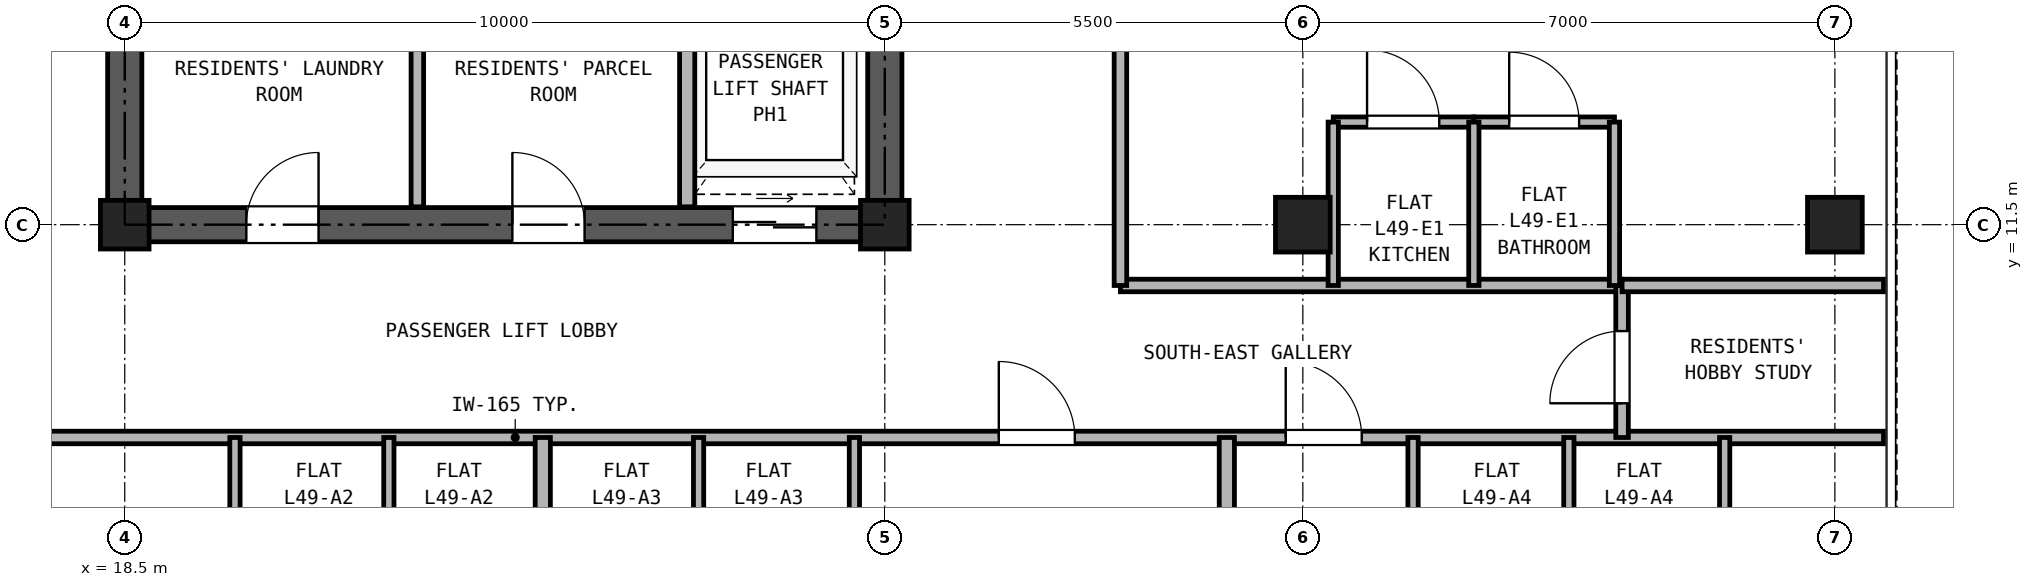
"""IFC4 building model, lengths in metres.
Left out: names, types, materials, properties, quantities, classifications, styles, units other than length and angle.
Written with IfcOpenShell. Run it as: python <this file> out.ifc"""

import sys

from ifc_helpers import new_model, si_unit, direction, frame, frame_2d, origin, origin_2d, place, context, subcontext, project, spatial, rectangle, hollow_rectangle, extrude, source, transform, mapped, element, fill, save


model = new_model("IFC4")
c1 = context("Model", 3, precision=1e-05, world=origin(), true_north=direction((0.0, 1.0)))
c2 = subcontext(c1, "Body", "Model", "MODEL_VIEW")
j1 = project(units=[si_unit("LENGTHUNIT", "METRE"), si_unit("PLANEANGLEUNIT", "RADIAN")], contexts=[c1])
p1 = place(None, origin())
s1 = spatial("IfcSite", under=j1, at=p1, CompositionType="ELEMENT")
p2 = place(p1, origin())
s2 = spatial("IfcBuilding", under=s1, at=p2, CompositionType="ELEMENT")
p3 = place(p2, frame((0.0, 0.0, 175.3)))
s3 = spatial("IfcBuildingStorey", under=s2, at=p3, CompositionType="ELEMENT", Elevation=175.3)
m1 = source(origin(), c2, "Body", "SweptSolid", [
    extrude(hollow_rectangle(XDim=0.72, YDim=0.72, WallThickness=0.04, at=origin_2d()), origin(), (0.0, 0.0, 1.0), 2.95),
])
p4 = place(p3, frame((41.0, 11.5, 0.0), z_axis=(0.0, 0.0, 1.0), x_axis=(1.0, 0.0, 0.0)))
e1 = element("IfcColumn", 1, at=p4, inside=s3, PredefinedType="COLUMN", context=c2, shape_type="MappedRepresentation", body=[
    mapped(m1, transform((0.0, 0.0, 0.0), x_axis=(1.0, 0.0, 0.0), y_axis=(0.0, 1.0, 0.0), z_axis=(0.0, 0.0, 1.0), scale=1.0)),
])
m2 = source(origin(), c2, "Body", "SweptSolid", [
    extrude(hollow_rectangle(XDim=0.64, YDim=0.64, WallThickness=0.035, at=origin_2d()), origin(), (0.0, 0.0, 1.0), 2.95),
])
for number, where, z_axis, x_axis in (
    (2, (18.5, 11.5, 0.0), (0.0, 0.0, 1.0), (1.0, 0.0, 0.0)),
    (3, (28.5, 11.5, 0.0), (0.0, 0.0, 1.0), (1.0, 0.0, 0.0)),
):
    element("IfcColumn", number, at=place(p3, frame(where, z_axis=z_axis, x_axis=x_axis)), inside=s3, PredefinedType="COLUMN", context=c2, shape_type="MappedRepresentation", body=[
        mapped(m2, transform((0.0, 0.0, 0.0), x_axis=(1.0, 0.0, 0.0), y_axis=(0.0, 1.0, 0.0), z_axis=(0.0, 0.0, 1.0), scale=1.0)),
    ])
p5 = place(p3, frame((34.0, 11.5, 0.0), z_axis=(0.0, 0.0, 1.0), x_axis=(1.0, 0.0, 0.0)))
e4 = element("IfcColumn", 4, at=p5, inside=s3, PredefinedType="COLUMN", context=c2, shape_type="MappedRepresentation", body=[
    mapped(m1, transform((0.0, 0.0, 0.0), x_axis=(1.0, 0.0, 0.0), y_axis=(0.0, 1.0, 0.0), z_axis=(0.0, 0.0, 1.0), scale=1.0)),
])
p6 = place(p3, frame((18.275, 11.5, 0.0), z_axis=(0.0, 0.0, 1.0), x_axis=(1.0, 0.0, 0.0)))
e5 = element("IfcWall", 5, at=p6, inside=s3, PredefinedType="SHEAR", context=c2, shape_type="SweptSolid", body=[
    extrude(rectangle(XDim=10.45, YDim=0.45, at=frame_2d((5.225, 0.0))), origin(), (0.0, 0.0, 1.0), 2.95),
])
p7 = place(p6, frame((1.825, 0.0, 0.0)))
e6 = element("IfcOpeningElement", 6, at=p7, cuts=e5, PredefinedType="OPENING", context=c2, shape_type="SweptSolid", body=[
    extrude(rectangle(XDim=0.95, YDim=2.15, at=frame_2d((0.475, 1.075))), frame((0.0, 0.235, 0.0), z_axis=(0.0, -1.0, 0.0), x_axis=(1.0, 0.0, 0.0)), (0.0, 0.0, 1.0), 0.47),
])
p8 = place(p6, frame((5.325, 0.0, 0.0)))
e7 = element("IfcOpeningElement", 7, at=p8, cuts=e5, PredefinedType="OPENING", context=c2, shape_type="SweptSolid", body=[
    extrude(rectangle(XDim=0.95, YDim=2.15, at=frame_2d((0.475, 1.075))), frame((0.0, 0.235, 0.0), z_axis=(0.0, -1.0, 0.0), x_axis=(1.0, 0.0, 0.0)), (0.0, 0.0, 1.0), 0.47),
])
p9 = place(p6, frame((8.225, 0.0, 0.0)))
e8 = element("IfcOpeningElement", 8, at=p9, cuts=e5, PredefinedType="OPENING", context=c2, shape_type="SweptSolid", body=[
    extrude(rectangle(XDim=1.1, YDim=2.25, at=frame_2d((0.55, 1.125))), frame((0.0, 0.235, 0.0), z_axis=(0.0, -1.0, 0.0), x_axis=(1.0, 0.0, 0.0)), (0.0, 0.0, 1.0), 0.47),
])
p10 = place(p3, frame((18.5, 11.725, 0.0), z_axis=(0.0, 0.0, 1.0), x_axis=(0.0, 1.0, 0.0)))
e9 = element("IfcWall", 9, at=p10, inside=s3, PredefinedType="SHEAR", context=c2, shape_type="SweptSolid", body=[
    extrude(rectangle(XDim=16.8, YDim=0.45, at=frame_2d((8.4, 0.0))), origin(), (0.0, 0.0, 1.0), 2.95),
])
p11 = place(p10, frame((7.425, 0.0, 0.0)))
e10 = element("IfcOpeningElement", 10, at=p11, cuts=e9, PredefinedType="OPENING", context=c2, shape_type="SweptSolid", body=[
    extrude(rectangle(XDim=1.15, YDim=2.2, at=frame_2d((0.575, 1.1))), frame((0.0, 0.235, 0.0), z_axis=(0.0, -1.0, 0.0), x_axis=(1.0, 0.0, 0.0)), (0.0, 0.0, 1.0), 0.47),
])
p12 = place(p3, frame((28.5, 11.725, 0.0), z_axis=(0.0, 0.0, 1.0), x_axis=(0.0, 1.0, 0.0)))
e11 = element("IfcWall", 11, at=p12, inside=s3, PredefinedType="SHEAR", context=c2, shape_type="SweptSolid", body=[
    extrude(rectangle(XDim=16.8, YDim=0.45, at=frame_2d((8.4, 0.0))), origin(), (0.0, 0.0, 1.0), 2.95),
])
p13 = place(p12, frame((7.425, 0.0, 0.0)))
e12 = element("IfcOpeningElement", 12, at=p13, cuts=e11, PredefinedType="OPENING", context=c2, shape_type="SweptSolid", body=[
    extrude(rectangle(XDim=1.15, YDim=2.2, at=frame_2d((0.575, 1.1))), frame((0.0, 0.235, 0.0), z_axis=(0.0, -1.0, 0.0), x_axis=(1.0, 0.0, 0.0)), (0.0, 0.0, 1.0), 0.47),
])
p14 = place(p3, frame((22.35, 11.735, 0.0), z_axis=(0.0, 0.0, 1.0), x_axis=(0.0, 1.0, 0.0)))
e13 = element("IfcWall", 13, at=p14, inside=s3, PredefinedType="PARTITIONING", context=c2, shape_type="SweptSolid", body=[
    extrude(rectangle(XDim=3.265, YDim=0.165, at=frame_2d((1.632, 0.0))), origin(), (0.0, 0.0, 1.0), 2.95),
])
p15 = place(p3, frame((25.9, 11.735, 0.0), z_axis=(0.0, 0.0, 1.0), x_axis=(0.0, 1.0, 0.0)))
e14 = element("IfcWall", 14, at=p15, inside=s3, PredefinedType="PARTITIONING", context=c2, shape_type="SweptSolid", body=[
    extrude(rectangle(XDim=3.265, YDim=0.2, at=frame_2d((1.632, 0.0))), origin(), (0.0, 0.0, 1.0), 2.95),
])
p16 = place(p3, frame((0.16, 8.7, 0.0), z_axis=(0.0, 0.0, 1.0), x_axis=(1.0, 0.0, 0.0)))
e15 = element("IfcWall", 15, at=p16, inside=s3, PredefinedType="PARTITIONING", context=c2, shape_type="SweptSolid", body=[
    extrude(rectangle(XDim=41.48, YDim=0.165, at=frame_2d((20.74, 0.0))), origin(), (0.0, 0.0, 1.0), 2.583),
])
p17 = place(p16, frame((11.815, 0.0, 0.0)))
e16 = element("IfcOpeningElement", 16, at=p17, cuts=e15, PredefinedType="OPENING", context=c2, shape_type="SweptSolid", body=[
    extrude(rectangle(XDim=1.0, YDim=2.15, at=frame_2d((0.5, 1.075))), frame((0.0, 0.093, 0.0), z_axis=(0.0, -1.0, 0.0), x_axis=(1.0, 0.0, 0.0)), (0.0, 0.0, 1.0), 0.185),
])
p18 = place(p16, frame((16.115, 0.0, 0.0)))
e17 = element("IfcOpeningElement", 17, at=p18, cuts=e15, PredefinedType="OPENING", context=c2, shape_type="SweptSolid", body=[
    extrude(rectangle(XDim=1.0, YDim=2.15, at=frame_2d((0.5, 1.075))), frame((0.0, 0.093, 0.0), z_axis=(0.0, -1.0, 0.0), x_axis=(1.0, 0.0, 0.0)), (0.0, 0.0, 1.0), 0.185),
])
p19 = place(p16, frame((29.84, 0.0, 0.0)))
e18 = element("IfcOpeningElement", 18, at=p19, cuts=e15, PredefinedType="OPENING", context=c2, shape_type="SweptSolid", body=[
    extrude(rectangle(XDim=1.0, YDim=2.15, at=frame_2d((0.5, 1.075))), frame((0.0, 0.093, 0.0), z_axis=(0.0, -1.0, 0.0), x_axis=(1.0, 0.0, 0.0)), (0.0, 0.0, 1.0), 0.185),
])
p20 = place(p16, frame((33.615, 0.0, 0.0)))
e19 = element("IfcOpeningElement", 19, at=p20, cuts=e15, PredefinedType="OPENING", context=c2, shape_type="SweptSolid", body=[
    extrude(rectangle(XDim=1.0, YDim=2.15, at=frame_2d((0.5, 1.075))), frame((0.0, 0.093, 0.0), z_axis=(0.0, -1.0, 0.0), x_axis=(1.0, 0.0, 0.0)), (0.0, 0.0, 1.0), 0.185),
])
p21 = place(p3, frame((31.6, 10.7, 0.0), z_axis=(0.0, 0.0, 1.0), x_axis=(1.0, 0.0, 0.0)))
e20 = element("IfcWall", 20, at=p21, inside=s3, PredefinedType="PARTITIONING", context=c2, shape_type="SweptSolid", body=[
    extrude(rectangle(XDim=6.6, YDim=0.165, at=frame_2d((3.3, 0.0))), origin(), (0.0, 0.0, 1.0), 2.95),
])
p22 = place(p3, frame((38.2, 8.7, 0.0), z_axis=(0.0, 0.0, 1.0), x_axis=(0.0, 1.0, 0.0)))
e21 = element("IfcWall", 21, at=p22, inside=s3, PredefinedType="PARTITIONING", context=c2, shape_type="SweptSolid", body=[
    extrude(rectangle(XDim=2.0, YDim=0.165, at=frame_2d((1.0, 0.0))), origin(), (0.0, 0.0, 1.0), 2.95),
])
p23 = place(p22, frame((0.45, 0.0, 0.0)))
e22 = element("IfcOpeningElement", 22, at=p23, cuts=e21, PredefinedType="OPENING", context=c2, shape_type="SweptSolid", body=[
    extrude(rectangle(XDim=0.95, YDim=2.15, at=frame_2d((0.475, 1.075))), frame((0.0, 0.093, 0.0), z_axis=(0.0, -1.0, 0.0), x_axis=(1.0, 0.0, 0.0)), (0.0, 0.0, 1.0), 0.185),
])
p24 = place(p3, frame((31.6, 10.7, 0.0), z_axis=(0.0, 0.0, 1.0), x_axis=(0.0, 1.0, 0.0)))
e23 = element("IfcWall", 23, at=p24, inside=s3, PredefinedType="PARTITIONING", context=c2, shape_type="SweptSolid", body=[
    extrude(rectangle(XDim=24.44, YDim=0.165, at=frame_2d((12.22, 0.0))), origin(), (0.0, 0.0, 1.0), 2.95),
])
p25 = place(p24, frame((3.25, 0.0, 0.0)))
e24 = element("IfcOpeningElement", 24, at=p25, cuts=e23, PredefinedType="OPENING", context=c2, shape_type="SweptSolid", body=[
    extrude(rectangle(XDim=1.0, YDim=2.15, at=frame_2d((0.5, 1.075))), frame((0.0, 0.093, 0.0), z_axis=(0.0, -1.0, 0.0), x_axis=(1.0, 0.0, 0.0)), (0.0, 0.0, 1.0), 0.185),
])
p26 = place(p24, frame((11.15, 0.0, 0.0)))
e25 = element("IfcOpeningElement", 25, at=p26, cuts=e23, PredefinedType="OPENING", context=c2, shape_type="SweptSolid", body=[
    extrude(rectangle(XDim=1.0, YDim=2.15, at=frame_2d((0.5, 1.075))), frame((0.0, 0.093, 0.0), z_axis=(0.0, -1.0, 0.0), x_axis=(1.0, 0.0, 0.0)), (0.0, 0.0, 1.0), 0.185),
])
p27 = place(p24, frame((17.7, 0.0, 0.0)))
e26 = element("IfcOpeningElement", 26, at=p27, cuts=e23, PredefinedType="OPENING", context=c2, shape_type="SweptSolid", body=[
    extrude(rectangle(XDim=1.0, YDim=2.15, at=frame_2d((0.5, 1.075))), frame((0.0, 0.093, 0.0), z_axis=(0.0, -1.0, 0.0), x_axis=(1.0, 0.0, 0.0)), (0.0, 0.0, 1.0), 0.185),
])
for number, where, z_axis, x_axis in (
    (27, (19.95, 6.55, 0.0), (0.0, 0.0, 1.0), (0.0, 1.0, 0.0)),
    (28, (21.975, 6.55, 0.0), (0.0, 0.0, 1.0), (0.0, 1.0, 0.0)),
):
    element("IfcWall", number, at=place(p3, frame(where, z_axis=z_axis, x_axis=x_axis)), inside=s3, PredefinedType="PARTITIONING", context=c2, shape_type="SweptSolid", body=[
        extrude(rectangle(XDim=2.15, YDim=0.135, at=frame_2d((1.075, 0.0))), origin(), (0.0, 0.0, 1.0), 2.95),
    ])
p28 = place(p3, frame((24.0, 0.16, 0.0), z_axis=(0.0, 0.0, 1.0), x_axis=(0.0, 1.0, 0.0)))
e29 = element("IfcWall", 29, at=p28, inside=s3, PredefinedType="PARTITIONING", context=c2, shape_type="SweptSolid", body=[
    extrude(rectangle(XDim=8.54, YDim=0.2, at=frame_2d((4.27, 0.0))), origin(), (0.0, 0.0, 1.0), 2.95),
])
for number, where, z_axis, x_axis in (
    (30, (26.05, 6.55, 0.0), (0.0, 0.0, 1.0), (0.0, 1.0, 0.0)),
    (31, (28.1, 6.55, 0.0), (0.0, 0.0, 1.0), (0.0, 1.0, 0.0)),
):
    element("IfcWall", number, at=place(p3, frame(where, z_axis=z_axis, x_axis=x_axis)), inside=s3, PredefinedType="PARTITIONING", context=c2, shape_type="SweptSolid", body=[
        extrude(rectangle(XDim=2.15, YDim=0.135, at=frame_2d((1.075, 0.0))), origin(), (0.0, 0.0, 1.0), 2.95),
    ])
p29 = place(p3, frame((33.0, 0.16, 0.0), z_axis=(0.0, 0.0, 1.0), x_axis=(0.0, 1.0, 0.0)))
e32 = element("IfcWall", 32, at=p29, inside=s3, PredefinedType="PARTITIONING", context=c2, shape_type="SweptSolid", body=[
    extrude(rectangle(XDim=8.54, YDim=0.2, at=frame_2d((4.27, 0.0))), origin(), (0.0, 0.0, 1.0), 2.95),
])
for number, where, z_axis, x_axis in (
    (33, (35.45, 6.55, 0.0), (0.0, 0.0, 1.0), (0.0, 1.0, 0.0)),
    (34, (37.5, 6.55, 0.0), (0.0, 0.0, 1.0), (0.0, 1.0, 0.0)),
    (35, (39.55, 6.55, 0.0), (0.0, 0.0, 1.0), (0.0, 1.0, 0.0)),
):
    element("IfcWall", number, at=place(p3, frame(where, z_axis=z_axis, x_axis=x_axis)), inside=s3, PredefinedType="PARTITIONING", context=c2, shape_type="SweptSolid", body=[
        extrude(rectangle(XDim=2.15, YDim=0.135, at=frame_2d((1.075, 0.0))), origin(), (0.0, 0.0, 1.0), 2.95),
    ])
p30 = place(p3, frame((38.2, 10.7, 0.0), z_axis=(0.0, 0.0, 1.0), x_axis=(1.0, 0.0, 0.0)))
e36 = element("IfcWall", 36, at=p30, inside=s3, PredefinedType="PARTITIONING", context=c2, shape_type="SweptSolid", body=[
    extrude(rectangle(XDim=3.44, YDim=0.165, at=frame_2d((1.72, 0.0))), origin(), (0.0, 0.0, 1.0), 2.95),
])
p31 = place(p3, frame((34.4, 12.85, 0.0), z_axis=(0.0, 0.0, 1.0), x_axis=(1.0, 0.0, 0.0)))
e37 = element("IfcWall", 37, at=p31, inside=s3, PredefinedType="PARTITIONING", context=c2, shape_type="SweptSolid", body=[
    extrude(rectangle(XDim=1.85, YDim=0.135, at=frame_2d((0.925, 0.0))), origin(), (0.0, 0.0, 1.0), 2.95),
])
p32 = place(p31, frame((0.445, 0.0, 0.0)))
e38 = element("IfcOpeningElement", 38, at=p32, cuts=e37, PredefinedType="OPENING", context=c2, shape_type="SweptSolid", body=[
    extrude(rectangle(XDim=0.95, YDim=2.15, at=frame_2d((0.475, 1.075))), frame((0.0, 0.077, 0.0), z_axis=(0.0, -1.0, 0.0), x_axis=(1.0, 0.0, 0.0)), (0.0, 0.0, 1.0), 0.155),
])
p33 = place(p3, frame((36.25, 12.85, 0.0), z_axis=(0.0, 0.0, 1.0), x_axis=(1.0, 0.0, 0.0)))
e39 = element("IfcWall", 39, at=p33, inside=s3, PredefinedType="PARTITIONING", context=c2, shape_type="SweptSolid", body=[
    extrude(rectangle(XDim=1.85, YDim=0.135, at=frame_2d((0.925, 0.0))), origin(), (0.0, 0.0, 1.0), 2.95),
])
p34 = place(p33, frame((0.465, 0.0, 0.0)))
e40 = element("IfcOpeningElement", 40, at=p34, cuts=e39, PredefinedType="OPENING", context=c2, shape_type="SweptSolid", body=[
    extrude(rectangle(XDim=0.92, YDim=2.1, at=frame_2d((0.46, 1.05))), frame((0.0, 0.077, 0.0), z_axis=(0.0, -1.0, 0.0), x_axis=(1.0, 0.0, 0.0)), (0.0, 0.0, 1.0), 0.155),
])
for number, where, z_axis, x_axis in (
    (41, (34.4, 10.7, 0.0), (0.0, 0.0, 1.0), (0.0, 1.0, 0.0)),
    (42, (36.25, 10.7, 0.0), (0.0, 0.0, 1.0), (0.0, 1.0, 0.0)),
    (43, (38.1, 10.7, 0.0), (0.0, 0.0, 1.0), (0.0, 1.0, 0.0)),
):
    element("IfcWall", number, at=place(p3, frame(where, z_axis=z_axis, x_axis=x_axis)), inside=s3, PredefinedType="PARTITIONING", context=c2, shape_type="SweptSolid", body=[
        extrude(rectangle(XDim=2.15, YDim=0.135, at=frame_2d((1.075, 0.0))), origin(), (0.0, 0.0, 1.0), 2.95),
    ])
p35 = place(p7, frame((0.95, 0.0, 0.0), z_axis=(0.0, 0.0, 1.0), x_axis=(-1.0, 0.0, 0.0)))
e44 = element("IfcDoor", 44, at=p35, inside=s3, OperationType="SINGLE_SWING_RIGHT", PredefinedType="DOOR", context=c2, shape_type="SweptSolid", body=[
    extrude(rectangle(XDim=0.95, YDim=2.15, at=frame_2d((0.475, 1.075))), frame((0.0, 0.025, 0.0), z_axis=(0.0, -1.0, 0.0), x_axis=(1.0, 0.0, 0.0)), (0.0, 0.0, 1.0), 0.05),
])
fill(e6, e44)
p36 = place(p8, frame((0.95, 0.0, 0.0), z_axis=(0.0, 0.0, 1.0), x_axis=(-1.0, 0.0, 0.0)))
e45 = element("IfcDoor", 45, at=p36, inside=s3, OperationType="SINGLE_SWING_LEFT", PredefinedType="DOOR", context=c2, shape_type="SweptSolid", body=[
    extrude(rectangle(XDim=0.95, YDim=2.15, at=frame_2d((0.475, 1.075))), frame((0.0, 0.025, 0.0), z_axis=(0.0, -1.0, 0.0), x_axis=(1.0, 0.0, 0.0)), (0.0, 0.0, 1.0), 0.05),
])
fill(e7, e45)
p37 = place(p9, frame((1.1, 0.0, 0.0), z_axis=(0.0, 0.0, 1.0), x_axis=(-1.0, 0.0, 0.0)))
e46 = element("IfcDoor", 46, at=p37, inside=s3, OperationType="DOUBLE_DOOR_SLIDING", PredefinedType="DOOR", context=c2, shape_type="SweptSolid", body=[
    extrude(rectangle(XDim=1.1, YDim=2.25, at=frame_2d((0.55, 1.125))), frame((0.0, 0.025, 0.0), z_axis=(0.0, -1.0, 0.0), x_axis=(1.0, 0.0, 0.0)), (0.0, 0.0, 1.0), 0.05),
])
fill(e8, e46)
p38 = place(p19, frame((1.0, 0.0, 0.0), z_axis=(0.0, 0.0, 1.0), x_axis=(-1.0, 0.0, 0.0)))
e47 = element("IfcDoor", 47, at=p38, inside=s3, OperationType="SINGLE_SWING_LEFT", PredefinedType="DOOR", context=c2, shape_type="SweptSolid", body=[
    extrude(rectangle(XDim=1.0, YDim=2.15, at=frame_2d((0.5, 1.075))), frame((0.0, 0.025, 0.0), z_axis=(0.0, -1.0, 0.0), x_axis=(1.0, 0.0, 0.0)), (0.0, 0.0, 1.0), 0.05),
])
fill(e18, e47)
p39 = place(p20, frame((1.0, 0.0, 0.0), z_axis=(0.0, 0.0, 1.0), x_axis=(-1.0, 0.0, 0.0)))
e48 = element("IfcDoor", 48, at=p39, inside=s3, OperationType="SINGLE_SWING_LEFT", PredefinedType="DOOR", context=c2, shape_type="SweptSolid", body=[
    extrude(rectangle(XDim=1.0, YDim=2.15, at=frame_2d((0.5, 1.075))), frame((0.0, 0.025, 0.0), z_axis=(0.0, -1.0, 0.0), x_axis=(1.0, 0.0, 0.0)), (0.0, 0.0, 1.0), 0.05),
])
fill(e19, e48)
p40 = place(p23, origin())
e49 = element("IfcDoor", 49, at=p40, inside=s3, OperationType="SINGLE_SWING_LEFT", PredefinedType="DOOR", context=c2, shape_type="SweptSolid", body=[
    extrude(rectangle(XDim=0.95, YDim=2.15, at=frame_2d((0.475, 1.075))), frame((0.0, 0.025, 0.0), z_axis=(0.0, -1.0, 0.0), x_axis=(1.0, 0.0, 0.0)), (0.0, 0.0, 1.0), 0.05),
])
fill(e22, e49)
p41 = place(p32, origin())
e50 = element("IfcDoor", 50, at=p41, inside=s3, OperationType="SINGLE_SWING_LEFT", PredefinedType="DOOR", context=c2, shape_type="SweptSolid", body=[
    extrude(rectangle(XDim=0.95, YDim=2.15, at=frame_2d((0.475, 1.075))), frame((0.0, 0.025, 0.0), z_axis=(0.0, -1.0, 0.0), x_axis=(1.0, 0.0, 0.0)), (0.0, 0.0, 1.0), 0.05),
])
fill(e38, e50)
p42 = place(p34, origin())
e51 = element("IfcDoor", 51, at=p42, inside=s3, OperationType="SINGLE_SWING_LEFT", PredefinedType="DOOR", context=c2, shape_type="SweptSolid", body=[
    extrude(rectangle(XDim=0.92, YDim=2.1, at=frame_2d((0.46, 1.05))), frame((0.0, 0.025, 0.0), z_axis=(0.0, -1.0, 0.0), x_axis=(1.0, 0.0, 0.0)), (0.0, 0.0, 1.0), 0.05),
])
fill(e40, e51)
save(model, sys.argv[1])
